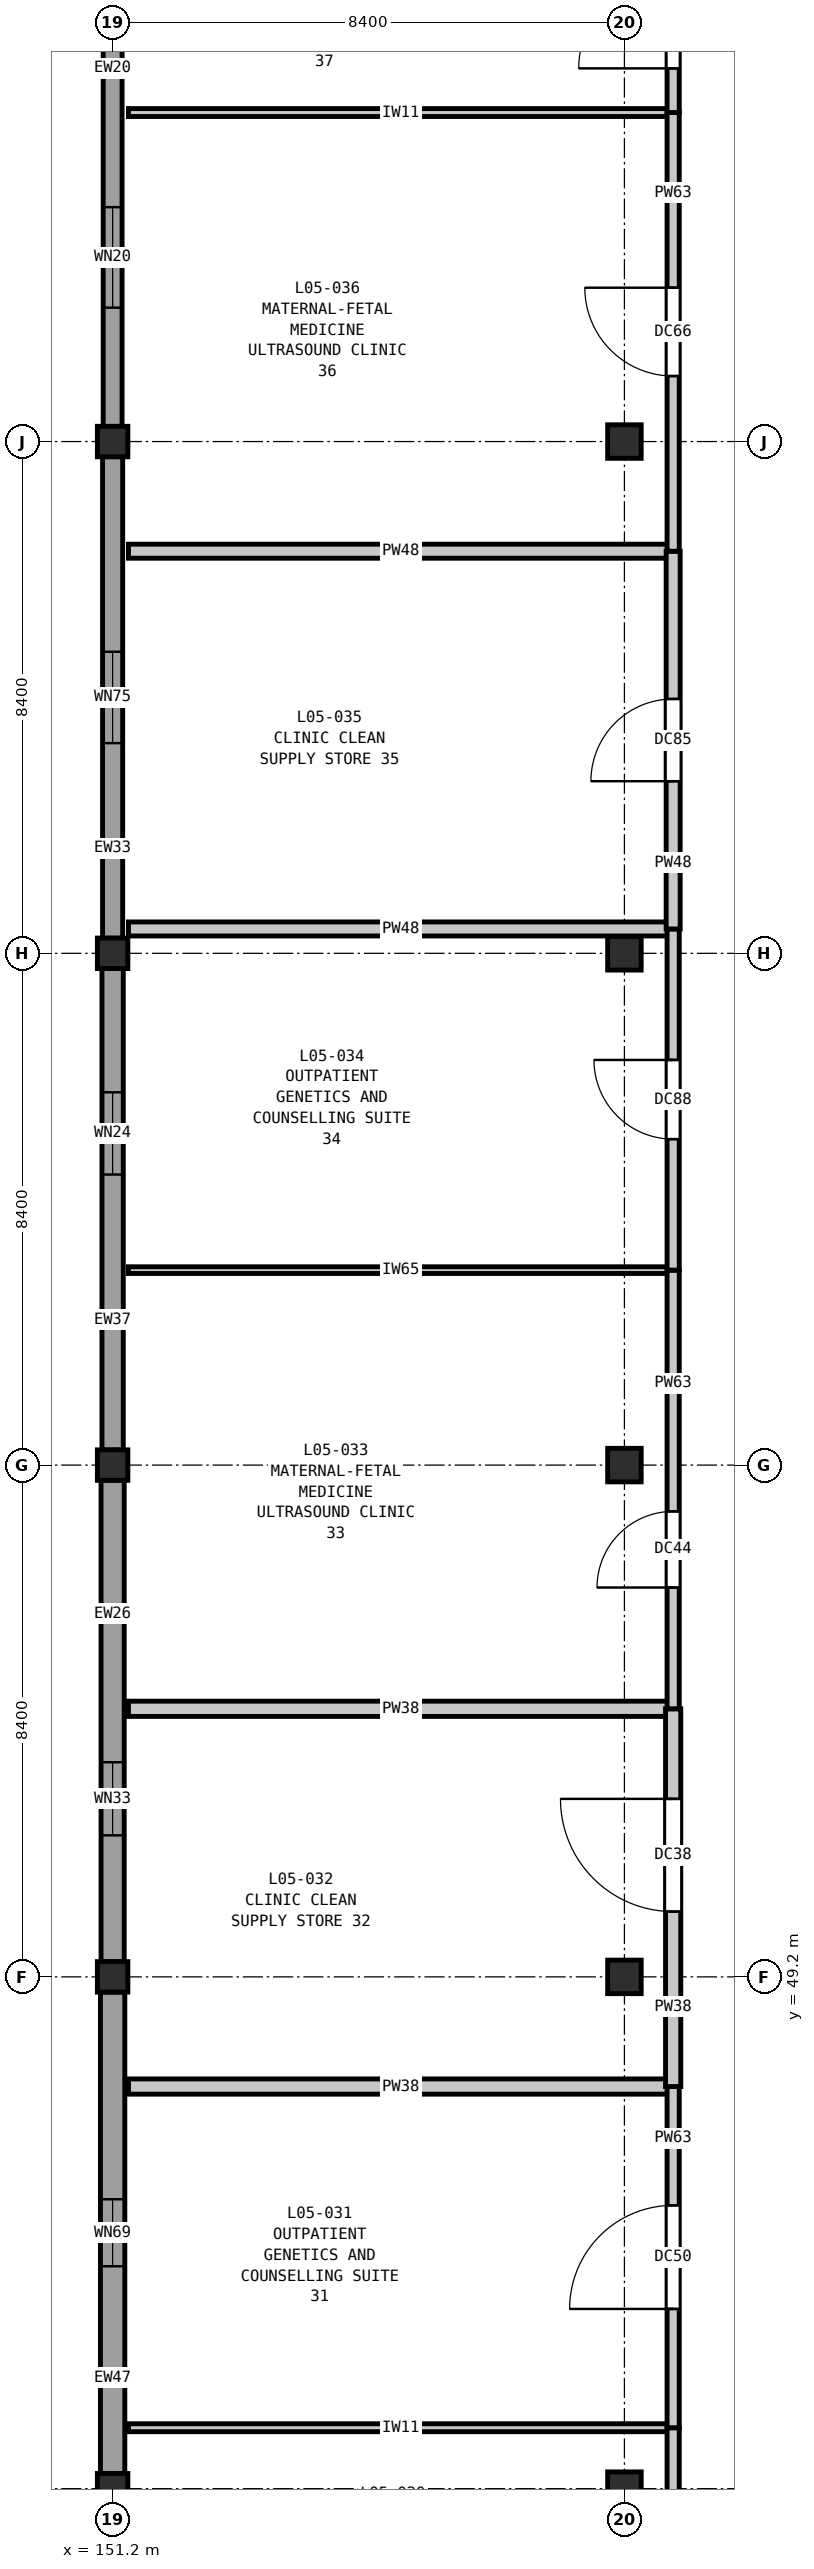
"""IFC4 building model, lengths in metres.
Left out: names, types, materials, properties, quantities, classifications, styles, units other than length and angle.
Written with IfcOpenShell. Run it as: python <this file> out.ifc"""

import sys

from ifc_helpers import new_model, si_unit, direction, frame, frame_2d, origin, origin_2d, place, context, subcontext, project, spatial, rectangle, extrude, element, fill, save


model = new_model("IFC4")
c1 = context("Model", 3, precision=1e-05, world=origin(), true_north=direction((0.0, 1.0)))
c2 = subcontext(c1, "Body", "Model", "MODEL_VIEW")
j1 = project(units=[si_unit("LENGTHUNIT", "METRE"), si_unit("PLANEANGLEUNIT", "RADIAN")], contexts=[c1])
p1 = place(None, origin())
s1 = spatial("IfcSite", under=j1, at=p1, CompositionType="ELEMENT")
p2 = place(p1, origin())
s2 = spatial("IfcBuilding", under=s1, at=p2, CompositionType="ELEMENT")
p3 = place(p2, frame((0.0, 0.0, 24.6)))
s3 = spatial("IfcBuildingStorey", under=s2, at=p3, CompositionType="ELEMENT", Elevation=24.6)
for number, where, z_axis, x_axis in (
    (1, (151.2, 40.8, 0.0), (0.0, 0.0, 1.0), (1.0, 0.0, 0.0)),
    (2, (151.2, 49.2, 0.0), (0.0, 0.0, 1.0), (1.0, 0.0, 0.0)),
    (3, (151.2, 57.6, 0.0), (0.0, 0.0, 1.0), (1.0, 0.0, 0.0)),
    (4, (151.2, 66.0, 0.0), (0.0, 0.0, 1.0), (1.0, 0.0, 0.0)),
    (5, (151.2, 74.4, 0.0), (0.0, 0.0, 1.0), (1.0, 0.0, 0.0)),
):
    element("IfcColumn", number, at=place(p3, frame(where, z_axis=z_axis, x_axis=x_axis)), inside=s3, PredefinedType="COLUMN", context=c2, shape_type="SweptSolid", body=[
        extrude(rectangle(XDim=0.5, YDim=0.5, at=origin_2d()), origin(), (0.0, 0.0, 1.0), 4.2),
    ])
for number, where, z_axis, x_axis in (
    (6, (159.6, 40.8, 0.0), (0.0, 0.0, 1.0), (1.0, 0.0, 0.0)),
    (7, (159.6, 49.2, 0.0), (0.0, 0.0, 1.0), (1.0, 0.0, 0.0)),
    (8, (159.6, 57.6, 0.0), (0.0, 0.0, 1.0), (1.0, 0.0, 0.0)),
    (9, (159.6, 66.0, 0.0), (0.0, 0.0, 1.0), (1.0, 0.0, 0.0)),
    (10, (159.6, 74.4, 0.0), (0.0, 0.0, 1.0), (1.0, 0.0, 0.0)),
):
    element("IfcColumn", number, at=place(p3, frame(where, z_axis=z_axis, x_axis=x_axis)), inside=s3, PredefinedType="COLUMN", context=c2, shape_type="SweptSolid", body=[
        extrude(rectangle(XDim=0.55, YDim=0.55, at=origin_2d()), origin(), (0.0, 0.0, 1.0), 4.2),
    ])
p4 = place(p3, frame((151.2, 41.048, 0.0), z_axis=(0.0, 0.0, 1.0), x_axis=(0.0, 1.0, 0.0)))
e11 = element("IfcWall", 11, at=p4, inside=s3, PredefinedType="SOLIDWALL", context=c2, shape_type="SweptSolid", body=[
    extrude(rectangle(XDim=7.904, YDim=0.4, at=frame_2d((3.952, 0.0))), origin(), (0.0, 0.0, 1.0), 3.48),
])
p5 = place(p4, frame((3.402, 0.0, 0.9)))
e12 = element("IfcOpeningElement", 12, at=p5, cuts=e11, PredefinedType="OPENING", context=c2, shape_type="SweptSolid", body=[
    extrude(rectangle(XDim=1.1, YDim=1.55, at=frame_2d((0.55, 0.775))), frame((0.0, 0.21, 0.0), z_axis=(0.0, -1.0, 0.0), x_axis=(1.0, 0.0, 0.0)), (0.0, 0.0, 1.0), 0.42),
])
p6 = place(p3, frame((151.2, 49.448, 0.0), z_axis=(0.0, 0.0, 1.0), x_axis=(0.0, 1.0, 0.0)))
e13 = element("IfcWall", 13, at=p6, inside=s3, PredefinedType="SOLIDWALL", context=c2, shape_type="SweptSolid", body=[
    extrude(rectangle(XDim=7.904, YDim=0.38, at=frame_2d((3.952, 0.0))), origin(), (0.0, 0.0, 1.0), 3.48),
])
p7 = place(p6, frame((2.075, 0.0, 0.9)))
e14 = element("IfcOpeningElement", 14, at=p7, cuts=e13, PredefinedType="OPENING", context=c2, shape_type="SweptSolid", body=[
    extrude(rectangle(XDim=1.2, YDim=1.55, at=frame_2d((0.6, 0.775))), frame((0.0, 0.2, 0.0), z_axis=(0.0, -1.0, 0.0), x_axis=(1.0, 0.0, 0.0)), (0.0, 0.0, 1.0), 0.4),
])
p8 = place(p3, frame((151.2, 57.848, 0.0), z_axis=(0.0, 0.0, 1.0), x_axis=(0.0, 1.0, 0.0)))
e15 = element("IfcWall", 15, at=p8, inside=s3, PredefinedType="SOLIDWALL", context=c2, shape_type="SweptSolid", body=[
    extrude(rectangle(XDim=7.904, YDim=0.35, at=frame_2d((3.952, 0.0))), origin(), (0.0, 0.0, 1.0), 3.48),
])
p9 = place(p8, frame((4.521, 0.0, 0.9)))
e16 = element("IfcOpeningElement", 16, at=p9, cuts=e15, PredefinedType="OPENING", context=c2, shape_type="SweptSolid", body=[
    extrude(rectangle(XDim=1.35, YDim=1.55, at=frame_2d((0.675, 0.775))), frame((0.0, 0.185, 0.0), z_axis=(0.0, -1.0, 0.0), x_axis=(1.0, 0.0, 0.0)), (0.0, 0.0, 1.0), 0.37),
])
p10 = place(p3, frame((151.2, 66.248, 0.0), z_axis=(0.0, 0.0, 1.0), x_axis=(0.0, 1.0, 0.0)))
e17 = element("IfcWall", 17, at=p10, inside=s3, PredefinedType="SOLIDWALL", context=c2, shape_type="SweptSolid", body=[
    extrude(rectangle(XDim=7.904, YDim=0.33, at=frame_2d((3.952, 0.0))), origin(), (0.0, 0.0, 1.0), 3.48),
])
p11 = place(p10, frame((3.202, 0.0, 0.9)))
e18 = element("IfcOpeningElement", 18, at=p11, cuts=e17, PredefinedType="OPENING", context=c2, shape_type="SweptSolid", body=[
    extrude(rectangle(XDim=1.5, YDim=1.55, at=frame_2d((0.75, 0.775))), frame((0.0, 0.175, 0.0), z_axis=(0.0, -1.0, 0.0), x_axis=(1.0, 0.0, 0.0)), (0.0, 0.0, 1.0), 0.35),
])
p12 = place(p3, frame((151.2, 74.648, 0.0), z_axis=(0.0, 0.0, 1.0), x_axis=(0.0, 1.0, 0.0)))
e19 = element("IfcWall", 19, at=p12, inside=s3, PredefinedType="SOLIDWALL", context=c2, shape_type="SweptSolid", body=[
    extrude(rectangle(XDim=7.904, YDim=0.31, at=frame_2d((3.952, 0.0))), origin(), (0.0, 0.0, 1.0), 3.48),
])
p13 = place(p12, frame((1.949, 0.0, 0.9)))
e20 = element("IfcOpeningElement", 20, at=p13, cuts=e19, PredefinedType="OPENING", context=c2, shape_type="SweptSolid", body=[
    extrude(rectangle(XDim=1.65, YDim=1.55, at=frame_2d((0.825, 0.775))), frame((0.0, 0.165, 0.0), z_axis=(0.0, -1.0, 0.0), x_axis=(1.0, 0.0, 0.0)), (0.0, 0.0, 1.0), 0.33),
])
p14 = place(p3, frame((151.46, 41.8, 0.0), z_axis=(0.0, 0.0, 1.0), x_axis=(1.0, 0.0, 0.0)))
e21 = element("IfcWall", 21, at=p14, inside=s3, PredefinedType="PARTITIONING", context=c2, shape_type="SweptSolid", body=[
    extrude(rectangle(XDim=8.94, YDim=0.13, at=frame_2d((4.47, 0.0))), origin(), (0.0, 0.0, 1.0), 3.92),
])
for number, where, z_axis, x_axis in (
    (22, (151.46, 47.4, 0.0), (0.0, 0.0, 1.0), (1.0, 0.0, 0.0)),
    (23, (151.46, 53.6, 0.0), (0.0, 0.0, 1.0), (1.0, 0.0, 0.0)),
):
    element("IfcWall", number, at=place(p3, frame(where, z_axis=z_axis, x_axis=x_axis)), inside=s3, PredefinedType="PARTITIONING", context=c2, shape_type="SweptSolid", body=[
        extrude(rectangle(XDim=8.94, YDim=0.25, at=frame_2d((4.47, 0.0))), origin(), (0.0, 0.0, 1.0), 3.92),
    ])
p15 = place(p3, frame((151.46, 60.8, 0.0), z_axis=(0.0, 0.0, 1.0), x_axis=(1.0, 0.0, 0.0)))
e24 = element("IfcWall", 24, at=p15, inside=s3, PredefinedType="PARTITIONING", context=c2, shape_type="SweptSolid", body=[
    extrude(rectangle(XDim=8.94, YDim=0.11, at=frame_2d((4.47, 0.0))), origin(), (0.0, 0.0, 1.0), 3.92),
])
for number, where, z_axis, x_axis in (
    (25, (151.46, 66.4, 0.0), (0.0, 0.0, 1.0), (1.0, 0.0, 0.0)),
    (26, (151.46, 72.6, 0.0), (0.0, 0.0, 1.0), (1.0, 0.0, 0.0)),
):
    element("IfcWall", number, at=place(p3, frame(where, z_axis=z_axis, x_axis=x_axis)), inside=s3, PredefinedType="PARTITIONING", context=c2, shape_type="SweptSolid", body=[
        extrude(rectangle(XDim=8.94, YDim=0.23, at=frame_2d((4.47, 0.0))), origin(), (0.0, 0.0, 1.0), 3.92),
    ])
p16 = place(p3, frame((151.46, 79.8, 0.0), z_axis=(0.0, 0.0, 1.0), x_axis=(1.0, 0.0, 0.0)))
e27 = element("IfcWall", 27, at=p16, inside=s3, PredefinedType="PARTITIONING", context=c2, shape_type="SweptSolid", body=[
    extrude(rectangle(XDim=8.94, YDim=0.13, at=frame_2d((4.47, 0.0))), origin(), (0.0, 0.0, 1.0), 3.92),
])
p17 = place(p3, frame((160.4, 34.6, 0.0), z_axis=(0.0, 0.0, 1.0), x_axis=(0.0, 1.0, 0.0)))
e28 = element("IfcWall", 28, at=p17, inside=s3, PredefinedType="PARTITIONING", context=c2, shape_type="SweptSolid", body=[
    extrude(rectangle(XDim=7.2, YDim=0.2, at=frame_2d((3.6, 0.0))), origin(), (0.0, 0.0, 1.0), 3.92),
])
p18 = place(p17, frame((2.825, 0.0, 0.0)))
e29 = element("IfcOpeningElement", 29, at=p18, cuts=e28, PredefinedType="OPENING", context=c2, shape_type="SweptSolid", body=[
    extrude(rectangle(XDim=1.55, YDim=2.25, at=frame_2d((0.775, 1.125))), frame((0.0, 0.11, 0.0), z_axis=(0.0, -1.0, 0.0), x_axis=(1.0, 0.0, 0.0)), (0.0, 0.0, 1.0), 0.22),
])
p19 = place(p3, frame((160.4, 41.8, 0.0), z_axis=(0.0, 0.0, 1.0), x_axis=(0.0, 1.0, 0.0)))
e30 = element("IfcWall", 30, at=p19, inside=s3, PredefinedType="PARTITIONING", context=c2, shape_type="SweptSolid", body=[
    extrude(rectangle(XDim=5.6, YDim=0.2, at=frame_2d((2.8, 0.0))), origin(), (0.0, 0.0, 1.0), 3.92),
])
p20 = place(p19, frame((1.95, 0.0, 0.0)))
e31 = element("IfcOpeningElement", 31, at=p20, cuts=e30, PredefinedType="OPENING", context=c2, shape_type="SweptSolid", body=[
    extrude(rectangle(XDim=1.7, YDim=2.3, at=frame_2d((0.85, 1.15))), frame((0.0, 0.11, 0.0), z_axis=(0.0, -1.0, 0.0), x_axis=(1.0, 0.0, 0.0)), (0.0, 0.0, 1.0), 0.22),
])
p21 = place(p3, frame((160.4, 47.4, 0.0), z_axis=(0.0, 0.0, 1.0), x_axis=(0.0, 1.0, 0.0)))
e32 = element("IfcWall", 32, at=p21, inside=s3, PredefinedType="PARTITIONING", context=c2, shape_type="SweptSolid", body=[
    extrude(rectangle(XDim=6.2, YDim=0.25, at=frame_2d((3.1, 0.0))), origin(), (0.0, 0.0, 1.0), 3.92),
])
p22 = place(p21, frame((2.872, 0.0, 0.0)))
e33 = element("IfcOpeningElement", 33, at=p22, cuts=e32, PredefinedType="OPENING", context=c2, shape_type="SweptSolid", body=[
    extrude(rectangle(XDim=1.85, YDim=2.3, at=frame_2d((0.925, 1.15))), frame((0.0, 0.135, 0.0), z_axis=(0.0, -1.0, 0.0), x_axis=(1.0, 0.0, 0.0)), (0.0, 0.0, 1.0), 0.27),
])
p23 = place(p3, frame((160.4, 53.6, 0.0), z_axis=(0.0, 0.0, 1.0), x_axis=(0.0, 1.0, 0.0)))
e34 = element("IfcWall", 34, at=p23, inside=s3, PredefinedType="PARTITIONING", context=c2, shape_type="SweptSolid", body=[
    extrude(rectangle(XDim=7.2, YDim=0.2, at=frame_2d((3.6, 0.0))), origin(), (0.0, 0.0, 1.0), 3.92),
])
p24 = place(p23, frame((1.99, 0.0, 0.0)))
e35 = element("IfcOpeningElement", 35, at=p24, cuts=e34, PredefinedType="OPENING", context=c2, shape_type="SweptSolid", body=[
    extrude(rectangle(XDim=1.25, YDim=2.15, at=frame_2d((0.625, 1.075))), frame((0.0, 0.11, 0.0), z_axis=(0.0, -1.0, 0.0), x_axis=(1.0, 0.0, 0.0)), (0.0, 0.0, 1.0), 0.22),
])
p25 = place(p3, frame((160.4, 60.8, 0.0), z_axis=(0.0, 0.0, 1.0), x_axis=(0.0, 1.0, 0.0)))
e36 = element("IfcWall", 36, at=p25, inside=s3, PredefinedType="PARTITIONING", context=c2, shape_type="SweptSolid", body=[
    extrude(rectangle(XDim=5.6, YDim=0.2, at=frame_2d((2.8, 0.0))), origin(), (0.0, 0.0, 1.0), 3.92),
])
p26 = place(p25, frame((2.15, 0.0, 0.0)))
e37 = element("IfcOpeningElement", 37, at=p26, cuts=e36, PredefinedType="OPENING", context=c2, shape_type="SweptSolid", body=[
    extrude(rectangle(XDim=1.3, YDim=2.2, at=frame_2d((0.65, 1.1))), frame((0.0, 0.11, 0.0), z_axis=(0.0, -1.0, 0.0), x_axis=(1.0, 0.0, 0.0)), (0.0, 0.0, 1.0), 0.22),
])
p27 = place(p3, frame((160.4, 66.4, 0.0), z_axis=(0.0, 0.0, 1.0), x_axis=(0.0, 1.0, 0.0)))
e38 = element("IfcWall", 38, at=p27, inside=s3, PredefinedType="PARTITIONING", context=c2, shape_type="SweptSolid", body=[
    extrude(rectangle(XDim=6.2, YDim=0.23, at=frame_2d((3.1, 0.0))), origin(), (0.0, 0.0, 1.0), 3.92),
])
p28 = place(p27, frame((2.425, 0.0, 0.0)))
e39 = element("IfcOpeningElement", 39, at=p28, cuts=e38, PredefinedType="OPENING", context=c2, shape_type="SweptSolid", body=[
    extrude(rectangle(XDim=1.35, YDim=2.2, at=frame_2d((0.675, 1.1))), frame((0.0, 0.125, 0.0), z_axis=(0.0, -1.0, 0.0), x_axis=(1.0, 0.0, 0.0)), (0.0, 0.0, 1.0), 0.25),
])
p29 = place(p3, frame((160.4, 72.6, 0.0), z_axis=(0.0, 0.0, 1.0), x_axis=(0.0, 1.0, 0.0)))
e40 = element("IfcWall", 40, at=p29, inside=s3, PredefinedType="PARTITIONING", context=c2, shape_type="SweptSolid", body=[
    extrude(rectangle(XDim=7.2, YDim=0.2, at=frame_2d((3.6, 0.0))), origin(), (0.0, 0.0, 1.0), 3.92),
])
p30 = place(p29, frame((2.875, 0.0, 0.0)))
e41 = element("IfcOpeningElement", 41, at=p30, cuts=e40, PredefinedType="OPENING", context=c2, shape_type="SweptSolid", body=[
    extrude(rectangle(XDim=1.45, YDim=2.25, at=frame_2d((0.725, 1.125))), frame((0.0, 0.11, 0.0), z_axis=(0.0, -1.0, 0.0), x_axis=(1.0, 0.0, 0.0)), (0.0, 0.0, 1.0), 0.22),
])
p31 = place(p3, frame((160.4, 79.8, 0.0), z_axis=(0.0, 0.0, 1.0), x_axis=(0.0, 1.0, 0.0)))
e42 = element("IfcWall", 42, at=p31, inside=s3, PredefinedType="PARTITIONING", context=c2, shape_type="SweptSolid", body=[
    extrude(rectangle(XDim=3.0, YDim=0.2, at=frame_2d((1.5, 0.0))), origin(), (0.0, 0.0, 1.0), 3.92),
])
p32 = place(p31, frame((0.725, 0.0, 0.0)))
e43 = element("IfcOpeningElement", 43, at=p32, cuts=e42, PredefinedType="OPENING", context=c2, shape_type="SweptSolid", body=[
    extrude(rectangle(XDim=1.55, YDim=2.25, at=frame_2d((0.775, 1.125))), frame((0.0, 0.11, 0.0), z_axis=(0.0, -1.0, 0.0), x_axis=(1.0, 0.0, 0.0)), (0.0, 0.0, 1.0), 0.22),
])
p33 = place(p5, origin())
e44 = element("IfcWindow", 44, at=p33, inside=s3, PartitioningType="SINGLE_PANEL", PredefinedType="WINDOW", context=c2, shape_type="SweptSolid", body=[
    extrude(rectangle(XDim=1.1, YDim=1.55, at=frame_2d((0.55, 0.775))), frame((0.0, 0.03, 0.0), z_axis=(0.0, -1.0, 0.0), x_axis=(1.0, 0.0, 0.0)), (0.0, 0.0, 1.0), 0.06),
])
fill(e12, e44)
p34 = place(p7, origin())
e45 = element("IfcWindow", 45, at=p34, inside=s3, PartitioningType="SINGLE_PANEL", PredefinedType="WINDOW", context=c2, shape_type="SweptSolid", body=[
    extrude(rectangle(XDim=1.2, YDim=1.55, at=frame_2d((0.6, 0.775))), frame((0.0, 0.03, 0.0), z_axis=(0.0, -1.0, 0.0), x_axis=(1.0, 0.0, 0.0)), (0.0, 0.0, 1.0), 0.06),
])
fill(e14, e45)
p35 = place(p9, origin())
e46 = element("IfcWindow", 46, at=p35, inside=s3, PartitioningType="SINGLE_PANEL", PredefinedType="WINDOW", context=c2, shape_type="SweptSolid", body=[
    extrude(rectangle(XDim=1.35, YDim=1.55, at=frame_2d((0.675, 0.775))), frame((0.0, 0.03, 0.0), z_axis=(0.0, -1.0, 0.0), x_axis=(1.0, 0.0, 0.0)), (0.0, 0.0, 1.0), 0.06),
])
fill(e16, e46)
p36 = place(p11, origin())
e47 = element("IfcWindow", 47, at=p36, inside=s3, PartitioningType="SINGLE_PANEL", PredefinedType="WINDOW", context=c2, shape_type="SweptSolid", body=[
    extrude(rectangle(XDim=1.5, YDim=1.55, at=frame_2d((0.75, 0.775))), frame((0.0, 0.03, 0.0), z_axis=(0.0, -1.0, 0.0), x_axis=(1.0, 0.0, 0.0)), (0.0, 0.0, 1.0), 0.06),
])
fill(e18, e47)
p37 = place(p13, origin())
e48 = element("IfcWindow", 48, at=p37, inside=s3, PartitioningType="DOUBLE_PANEL_VERTICAL", PredefinedType="WINDOW", context=c2, shape_type="SweptSolid", body=[
    extrude(rectangle(XDim=1.65, YDim=1.55, at=frame_2d((0.825, 0.775))), frame((0.0, 0.03, 0.0), z_axis=(0.0, -1.0, 0.0), x_axis=(1.0, 0.0, 0.0)), (0.0, 0.0, 1.0), 0.06),
])
fill(e20, e48)
p38 = place(p20, origin())
e49 = element("IfcDoor", 49, at=p38, inside=s3, OperationType="SINGLE_SWING_LEFT", PredefinedType="DOOR", context=c2, shape_type="SweptSolid", body=[
    extrude(rectangle(XDim=1.7, YDim=2.3, at=frame_2d((0.85, 1.15))), frame((0.0, 0.025, 0.0), z_axis=(0.0, -1.0, 0.0), x_axis=(1.0, 0.0, 0.0)), (0.0, 0.0, 1.0), 0.05),
])
fill(e31, e49)
p39 = place(p22, origin())
e50 = element("IfcDoor", 50, at=p39, inside=s3, OperationType="SINGLE_SWING_RIGHT", PredefinedType="DOOR", context=c2, shape_type="SweptSolid", body=[
    extrude(rectangle(XDim=1.85, YDim=2.3, at=frame_2d((0.925, 1.15))), frame((0.0, 0.025, 0.0), z_axis=(0.0, -1.0, 0.0), x_axis=(1.0, 0.0, 0.0)), (0.0, 0.0, 1.0), 0.05),
])
fill(e33, e50)
p40 = place(p24, origin())
e51 = element("IfcDoor", 51, at=p40, inside=s3, OperationType="SINGLE_SWING_LEFT", PredefinedType="DOOR", context=c2, shape_type="SweptSolid", body=[
    extrude(rectangle(XDim=1.25, YDim=2.15, at=frame_2d((0.625, 1.075))), frame((0.0, 0.025, 0.0), z_axis=(0.0, -1.0, 0.0), x_axis=(1.0, 0.0, 0.0)), (0.0, 0.0, 1.0), 0.05),
])
fill(e35, e51)
p41 = place(p26, origin())
e52 = element("IfcDoor", 52, at=p41, inside=s3, OperationType="SINGLE_SWING_RIGHT", PredefinedType="DOOR", context=c2, shape_type="SweptSolid", body=[
    extrude(rectangle(XDim=1.3, YDim=2.2, at=frame_2d((0.65, 1.1))), frame((0.0, 0.025, 0.0), z_axis=(0.0, -1.0, 0.0), x_axis=(1.0, 0.0, 0.0)), (0.0, 0.0, 1.0), 0.05),
])
fill(e37, e52)
p42 = place(p28, origin())
e53 = element("IfcDoor", 53, at=p42, inside=s3, OperationType="SINGLE_SWING_LEFT", PredefinedType="DOOR", context=c2, shape_type="SweptSolid", body=[
    extrude(rectangle(XDim=1.35, YDim=2.2, at=frame_2d((0.675, 1.1))), frame((0.0, 0.025, 0.0), z_axis=(0.0, -1.0, 0.0), x_axis=(1.0, 0.0, 0.0)), (0.0, 0.0, 1.0), 0.05),
])
fill(e39, e53)
p43 = place(p30, origin())
e54 = element("IfcDoor", 54, at=p43, inside=s3, OperationType="SINGLE_SWING_RIGHT", PredefinedType="DOOR", context=c2, shape_type="SweptSolid", body=[
    extrude(rectangle(XDim=1.45, YDim=2.25, at=frame_2d((0.725, 1.125))), frame((0.0, 0.025, 0.0), z_axis=(0.0, -1.0, 0.0), x_axis=(1.0, 0.0, 0.0)), (0.0, 0.0, 1.0), 0.05),
])
fill(e41, e54)
p44 = place(p32, origin())
e55 = element("IfcDoor", 55, at=p44, inside=s3, OperationType="SINGLE_SWING_LEFT", PredefinedType="DOOR", context=c2, shape_type="SweptSolid", body=[
    extrude(rectangle(XDim=1.55, YDim=2.25, at=frame_2d((0.775, 1.125))), frame((0.0, 0.025, 0.0), z_axis=(0.0, -1.0, 0.0), x_axis=(1.0, 0.0, 0.0)), (0.0, 0.0, 1.0), 0.05),
])
fill(e43, e55)
save(model, sys.argv[1])
